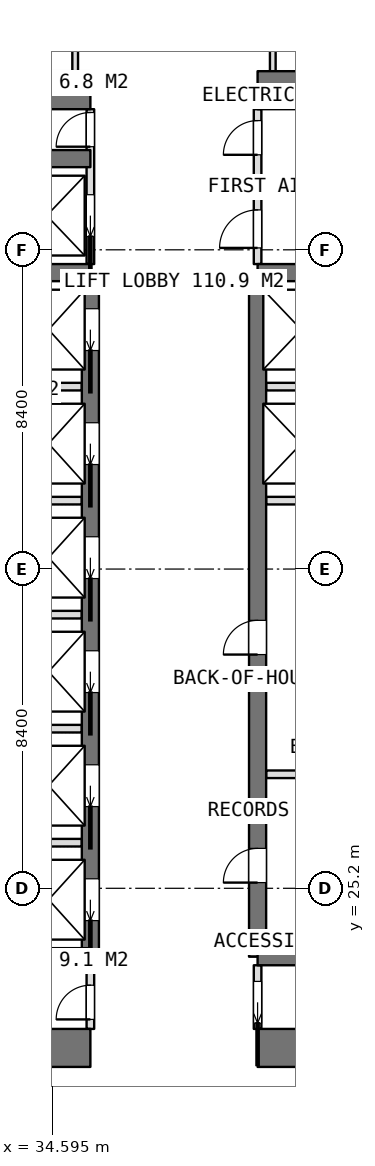
"""IFC4 building model, lengths in metres.
Left out: names, types, materials, properties, quantities, classifications, styles, units other than length and angle.
Written with IfcOpenShell. Run it as: python <this file> out.ifc"""

import sys

from ifc_helpers import new_model, si_unit, direction, frame, frame_2d, origin, place, context, subcontext, project, spatial, rectangle, extrude, element, fill, save


model = new_model("IFC4")
c1 = context("Model", 3, precision=1e-05, world=origin(), true_north=direction((0.0, 1.0)))
c2 = subcontext(c1, "Body", "Model", "MODEL_VIEW")
j1 = project(units=[si_unit("LENGTHUNIT", "METRE"), si_unit("PLANEANGLEUNIT", "RADIAN")], contexts=[c1])
p1 = place(None, origin())
s1 = spatial("IfcSite", under=j1, at=p1, CompositionType="ELEMENT")
p2 = place(p1, origin())
s2 = spatial("IfcBuilding", under=s1, at=p2, CompositionType="ELEMENT")
p3 = place(p2, frame((0.0, 0.0, 187.7)))
s3 = spatial("IfcBuildingStorey", under=s2, at=p3, CompositionType="ELEMENT", Elevation=187.7)
p4 = place(p3, frame((25.2, 21.0, 0.0), z_axis=(0.0, 0.0, 1.0), x_axis=(1.0, 0.0, 0.0)))
e1 = element("IfcWall", 1, at=p4, inside=s3, PredefinedType="SHEAR", context=c2, shape_type="SweptSolid", body=[
    extrude(rectangle(XDim=10.4, YDim=1.0, at=frame_2d((5.2, 0.0))), origin(), (0.0, 0.0, 1.0), 3.75),
])
p5 = place(p3, frame((40.0, 21.0, 0.0), z_axis=(0.0, 0.0, 1.0), x_axis=(1.0, 0.0, 0.0)))
e2 = element("IfcWall", 2, at=p5, inside=s3, PredefinedType="SHEAR", context=c2, shape_type="SweptSolid", body=[
    extrude(rectangle(XDim=10.4, YDim=1.0, at=frame_2d((5.2, 0.0))), origin(), (0.0, 0.0, 1.0), 3.75),
])
p6 = place(p3, frame((25.2, 46.2, 0.0), z_axis=(0.0, 0.0, 1.0), x_axis=(1.0, 0.0, 0.0)))
e3 = element("IfcWall", 3, at=p6, inside=s3, PredefinedType="SHEAR", context=c2, shape_type="SweptSolid", body=[
    extrude(rectangle(XDim=10.4, YDim=1.0, at=frame_2d((5.2, 0.0))), origin(), (0.0, 0.0, 1.0), 3.75),
])
p7 = place(p3, frame((40.0, 46.2, 0.0), z_axis=(0.0, 0.0, 1.0), x_axis=(1.0, 0.0, 0.0)))
e4 = element("IfcWall", 4, at=p7, inside=s3, PredefinedType="SHEAR", context=c2, shape_type="SweptSolid", body=[
    extrude(rectangle(XDim=10.4, YDim=1.0, at=frame_2d((5.2, 0.0))), origin(), (0.0, 0.0, 1.0), 3.75),
])
p8 = place(p3, frame((35.6, 23.4, 0.0), z_axis=(0.0, 0.0, 1.0), x_axis=(0.0, 1.0, 0.0)))
e5 = element("IfcWall", 5, at=p8, inside=s3, PredefinedType="SHEAR", context=c2, shape_type="SweptSolid", body=[
    extrude(rectangle(XDim=18.0, YDim=0.45, at=frame_2d((9.0, 0.0))), origin(), (0.0, 0.0, 1.0), 3.75),
])
p9 = place(p8, frame((0.95, 0.0, 0.0)))
e6 = element("IfcOpeningElement", 6, at=p9, cuts=e5, PredefinedType="OPENING", context=c2, shape_type="SweptSolid", body=[
    extrude(rectangle(XDim=1.1, YDim=2.1, at=frame_2d((0.55, 1.05))), frame((0.0, 0.235, 0.0), z_axis=(0.0, -1.0, 0.0), x_axis=(1.0, 0.0, 0.0)), (0.0, 0.0, 1.0), 0.47),
])
p10 = place(p8, frame((3.95, 0.0, 0.0)))
e7 = element("IfcOpeningElement", 7, at=p10, cuts=e5, PredefinedType="OPENING", context=c2, shape_type="SweptSolid", body=[
    extrude(rectangle(XDim=1.1, YDim=2.1, at=frame_2d((0.55, 1.05))), frame((0.0, 0.235, 0.0), z_axis=(0.0, -1.0, 0.0), x_axis=(1.0, 0.0, 0.0)), (0.0, 0.0, 1.0), 0.47),
])
p11 = place(p8, frame((6.95, 0.0, 0.0)))
e8 = element("IfcOpeningElement", 8, at=p11, cuts=e5, PredefinedType="OPENING", context=c2, shape_type="SweptSolid", body=[
    extrude(rectangle(XDim=1.1, YDim=2.1, at=frame_2d((0.55, 1.05))), frame((0.0, 0.235, 0.0), z_axis=(0.0, -1.0, 0.0), x_axis=(1.0, 0.0, 0.0)), (0.0, 0.0, 1.0), 0.47),
])
p12 = place(p8, frame((9.95, 0.0, 0.0)))
e9 = element("IfcOpeningElement", 9, at=p12, cuts=e5, PredefinedType="OPENING", context=c2, shape_type="SweptSolid", body=[
    extrude(rectangle(XDim=1.1, YDim=2.1, at=frame_2d((0.55, 1.05))), frame((0.0, 0.235, 0.0), z_axis=(0.0, -1.0, 0.0), x_axis=(1.0, 0.0, 0.0)), (0.0, 0.0, 1.0), 0.47),
])
p13 = place(p8, frame((12.95, 0.0, 0.0)))
e10 = element("IfcOpeningElement", 10, at=p13, cuts=e5, PredefinedType="OPENING", context=c2, shape_type="SweptSolid", body=[
    extrude(rectangle(XDim=1.1, YDim=2.1, at=frame_2d((0.55, 1.05))), frame((0.0, 0.235, 0.0), z_axis=(0.0, -1.0, 0.0), x_axis=(1.0, 0.0, 0.0)), (0.0, 0.0, 1.0), 0.47),
])
p14 = place(p8, frame((15.95, 0.0, 0.0)))
e11 = element("IfcOpeningElement", 11, at=p14, cuts=e5, PredefinedType="OPENING", context=c2, shape_type="SweptSolid", body=[
    extrude(rectangle(XDim=1.1, YDim=2.1, at=frame_2d((0.55, 1.05))), frame((0.0, 0.235, 0.0), z_axis=(0.0, -1.0, 0.0), x_axis=(1.0, 0.0, 0.0)), (0.0, 0.0, 1.0), 0.47),
])
p15 = place(p3, frame((40.0, 23.4, 0.0), z_axis=(0.0, 0.0, 1.0), x_axis=(0.0, 1.0, 0.0)))
e12 = element("IfcWall", 12, at=p15, inside=s3, PredefinedType="SHEAR", context=c2, shape_type="SweptSolid", body=[
    extrude(rectangle(XDim=18.0, YDim=0.45, at=frame_2d((9.0, 0.0))), origin(), (0.0, 0.0, 1.0), 3.75),
])
p16 = place(p15, frame((1.95, 0.0, 0.0)))
e13 = element("IfcOpeningElement", 13, at=p16, cuts=e12, PredefinedType="OPENING", context=c2, shape_type="SweptSolid", body=[
    extrude(rectangle(XDim=0.9, YDim=2.1, at=frame_2d((0.45, 1.05))), frame((0.0, 0.235, 0.0), z_axis=(0.0, -1.0, 0.0), x_axis=(1.0, 0.0, 0.0)), (0.0, 0.0, 1.0), 0.47),
])
p17 = place(p15, frame((7.95, 0.0, 0.0)))
e14 = element("IfcOpeningElement", 14, at=p17, cuts=e12, PredefinedType="OPENING", context=c2, shape_type="SweptSolid", body=[
    extrude(rectangle(XDim=0.9, YDim=2.1, at=frame_2d((0.45, 1.05))), frame((0.0, 0.235, 0.0), z_axis=(0.0, -1.0, 0.0), x_axis=(1.0, 0.0, 0.0)), (0.0, 0.0, 1.0), 0.47),
])
for number, where, z_axis, x_axis in (
    (15, (31.8, 23.4, 0.0), (0.0, 0.0, 1.0), (1.0, 0.0, 0.0)),
    (16, (31.8, 41.4, 0.0), (0.0, 0.0, 1.0), (1.0, 0.0, 0.0)),
    (17, (31.8, 44.4, 0.0), (0.0, 0.0, 1.0), (1.0, 0.0, 0.0)),
    (18, (40.0, 23.4, 0.0), (0.0, 0.0, 1.0), (1.0, 0.0, 0.0)),
    (19, (40.0, 41.4, 0.0), (0.0, 0.0, 1.0), (1.0, 0.0, 0.0)),
):
    element("IfcWall", number, at=place(p3, frame(where, z_axis=z_axis, x_axis=x_axis)), inside=s3, PredefinedType="SHEAR", context=c2, shape_type="SweptSolid", body=[
        extrude(rectangle(XDim=3.8, YDim=0.45, at=frame_2d((1.9, 0.0))), origin(), (0.0, 0.0, 1.0), 3.75),
    ])
for number, where, z_axis, x_axis in (
    (20, (32.025, 26.4, 0.0), (0.0, 0.0, 1.0), (1.0, 0.0, 0.0)),
    (21, (32.025, 29.4, 0.0), (0.0, 0.0, 1.0), (1.0, 0.0, 0.0)),
    (22, (32.025, 32.4, 0.0), (0.0, 0.0, 1.0), (1.0, 0.0, 0.0)),
    (23, (32.025, 35.4, 0.0), (0.0, 0.0, 1.0), (1.0, 0.0, 0.0)),
    (24, (32.025, 38.4, 0.0), (0.0, 0.0, 1.0), (1.0, 0.0, 0.0)),
):
    element("IfcWall", number, at=place(p3, frame(where, z_axis=z_axis, x_axis=x_axis)), inside=s3, PredefinedType="PARTITIONING", context=c2, shape_type="SweptSolid", body=[
        extrude(rectangle(XDim=3.35, YDim=0.2, at=frame_2d((1.675, 0.0))), origin(), (0.0, 0.0, 1.0), 3.5),
    ])
for number, where, z_axis, x_axis in (
    (25, (40.225, 35.4, 0.0), (0.0, 0.0, 1.0), (1.0, 0.0, 0.0)),
    (26, (40.225, 38.4, 0.0), (0.0, 0.0, 1.0), (1.0, 0.0, 0.0)),
):
    element("IfcWall", number, at=place(p3, frame(where, z_axis=z_axis, x_axis=x_axis)), inside=s3, PredefinedType="PARTITIONING", context=c2, shape_type="SweptSolid", body=[
        extrude(rectangle(XDim=3.35, YDim=0.2, at=frame_2d((1.675, 0.0))), origin(), (0.0, 0.0, 1.0), 3.5),
    ])
p18 = place(p3, frame((40.0, 21.5, 0.0), z_axis=(0.0, 0.0, 1.0), x_axis=(0.0, 1.0, 0.0)))
e27 = element("IfcWall", 27, at=p18, inside=s3, PredefinedType="PARTITIONING", context=c2, shape_type="SweptSolid", body=[
    extrude(rectangle(XDim=1.675, YDim=0.2, at=frame_2d((0.837, 0.0))), origin(), (0.0, 0.0, 1.0), 3.5),
])
p19 = place(p18, frame((0.15, 0.0, 0.0)))
e28 = element("IfcOpeningElement", 28, at=p19, cuts=e27, PredefinedType="OPENING", context=c2, shape_type="SweptSolid", body=[
    extrude(rectangle(XDim=1.1, YDim=2.1, at=frame_2d((0.55, 1.05))), frame((0.0, 0.11, 0.0), z_axis=(0.0, -1.0, 0.0), x_axis=(1.0, 0.0, 0.0)), (0.0, 0.0, 1.0), 0.22),
])
p20 = place(p3, frame((40.0, 41.625, 0.0), z_axis=(0.0, 0.0, 1.0), x_axis=(0.0, 1.0, 0.0)))
e29 = element("IfcWall", 29, at=p20, inside=s3, PredefinedType="PARTITIONING", context=c2, shape_type="SweptSolid", body=[
    extrude(rectangle(XDim=4.075, YDim=0.2, at=frame_2d((2.038, 0.0))), origin(), (0.0, 0.0, 1.0), 3.5),
])
p21 = place(p20, frame((2.875, 0.0, 0.0)))
e30 = element("IfcOpeningElement", 30, at=p21, cuts=e29, PredefinedType="OPENING", context=c2, shape_type="SweptSolid", body=[
    extrude(rectangle(XDim=0.9, YDim=2.1, at=frame_2d((0.45, 1.05))), frame((0.0, 0.11, 0.0), z_axis=(0.0, -1.0, 0.0), x_axis=(1.0, 0.0, 0.0)), (0.0, 0.0, 1.0), 0.22),
])
p22 = place(p20, frame((0.425, 0.0, 0.0)))
e31 = element("IfcOpeningElement", 31, at=p22, cuts=e29, PredefinedType="OPENING", context=c2, shape_type="SweptSolid", body=[
    extrude(rectangle(XDim=1.0, YDim=2.1, at=frame_2d((0.5, 1.05))), frame((0.0, 0.11, 0.0), z_axis=(0.0, -1.0, 0.0), x_axis=(1.0, 0.0, 0.0)), (0.0, 0.0, 1.0), 0.22),
])
p23 = place(p3, frame((35.6, 41.625, 0.0), z_axis=(0.0, 0.0, 1.0), x_axis=(0.0, 1.0, 0.0)))
e32 = element("IfcWall", 32, at=p23, inside=s3, PredefinedType="PARTITIONING", context=c2, shape_type="SweptSolid", body=[
    extrude(rectangle(XDim=4.075, YDim=0.2, at=frame_2d((2.038, 0.0))), origin(), (0.0, 0.0, 1.0), 3.5),
])
p24 = place(p23, frame((3.088, 0.0, 0.0)))
e33 = element("IfcOpeningElement", 33, at=p24, cuts=e32, PredefinedType="OPENING", context=c2, shape_type="SweptSolid", body=[
    extrude(rectangle(XDim=0.9, YDim=2.1, at=frame_2d((0.45, 1.05))), frame((0.0, 0.11, 0.0), z_axis=(0.0, -1.0, 0.0), x_axis=(1.0, 0.0, 0.0)), (0.0, 0.0, 1.0), 0.22),
])
p25 = place(p23, frame((0.725, 0.0, 0.0)))
e34 = element("IfcOpeningElement", 34, at=p25, cuts=e32, PredefinedType="OPENING", context=c2, shape_type="SweptSolid", body=[
    extrude(rectangle(XDim=1.1, YDim=2.1, at=frame_2d((0.55, 1.05))), frame((0.0, 0.11, 0.0), z_axis=(0.0, -1.0, 0.0), x_axis=(1.0, 0.0, 0.0)), (0.0, 0.0, 1.0), 0.22),
])
p26 = place(p3, frame((35.6, 21.5, 0.0), z_axis=(0.0, 0.0, 1.0), x_axis=(0.0, 1.0, 0.0)))
e35 = element("IfcWall", 35, at=p26, inside=s3, PredefinedType="PARTITIONING", context=c2, shape_type="SweptSolid", body=[
    extrude(rectangle(XDim=1.675, YDim=0.2, at=frame_2d((0.837, 0.0))), origin(), (0.0, 0.0, 1.0), 3.5),
])
p27 = place(p26, frame((0.25, 0.0, 0.0)))
e36 = element("IfcOpeningElement", 36, at=p27, cuts=e35, PredefinedType="OPENING", context=c2, shape_type="SweptSolid", body=[
    extrude(rectangle(XDim=0.9, YDim=2.1, at=frame_2d((0.45, 1.05))), frame((0.0, 0.11, 0.0), z_axis=(0.0, -1.0, 0.0), x_axis=(1.0, 0.0, 0.0)), (0.0, 0.0, 1.0), 0.22),
])
p28 = place(p3, frame((40.225, 28.2, 0.0), z_axis=(0.0, 0.0, 1.0), x_axis=(1.0, 0.0, 0.0)))
e37 = element("IfcWall", 37, at=p28, inside=s3, PredefinedType="PARTITIONING", context=c2, shape_type="SweptSolid", body=[
    extrude(rectangle(XDim=3.35, YDim=0.2, at=frame_2d((1.675, 0.0))), origin(), (0.0, 0.0, 1.0), 3.5),
])
p29 = place(p3, frame((40.0, 43.7, 0.0), z_axis=(0.0, 0.0, 1.0), x_axis=(1.0, 0.0, 0.0)))
e38 = element("IfcWall", 38, at=p29, inside=s3, PredefinedType="PARTITIONING", context=c2, shape_type="SweptSolid", body=[
    extrude(rectangle(XDim=3.575, YDim=0.2, at=frame_2d((1.788, 0.0))), origin(), (0.0, 0.0, 1.0), 3.5),
])
for number, where, z_axis, x_axis in (
    (39, (40.4, 46.7, 0.0), (0.0, 0.0, 1.0), (0.0, 1.0, 0.0)),
    (40, (35.2, 46.7, 0.0), (0.0, 0.0, 1.0), (0.0, 1.0, 0.0)),
):
    element("IfcWall", number, at=place(p3, frame(where, z_axis=z_axis, x_axis=x_axis)), inside=s3, PredefinedType="PARTITIONING", context=c2, shape_type="SweptSolid", body=[
        extrude(rectangle(XDim=2.625, YDim=0.15, at=frame_2d((1.312, 0.0))), origin(), (0.0, 0.0, 1.0), 3.5),
    ])
p30 = place(p19, origin())
e41 = element("IfcDoor", 41, at=p30, inside=s3, OperationType="SLIDING_TO_LEFT", PredefinedType="DOOR", context=c2, shape_type="SweptSolid", body=[
    extrude(rectangle(XDim=1.1, YDim=2.1, at=frame_2d((0.55, 1.05))), frame((0.0, 0.025, 0.0), z_axis=(0.0, -1.0, 0.0), x_axis=(1.0, 0.0, 0.0)), (0.0, 0.0, 1.0), 0.05),
])
fill(e28, e41)
p31 = place(p27, origin())
e42 = element("IfcDoor", 42, at=p31, inside=s3, OperationType="SINGLE_SWING_LEFT", PredefinedType="DOOR", context=c2, shape_type="SweptSolid", body=[
    extrude(rectangle(XDim=0.9, YDim=2.1, at=frame_2d((0.45, 1.05))), frame((0.0, 0.025, 0.0), z_axis=(0.0, -1.0, 0.0), x_axis=(1.0, 0.0, 0.0)), (0.0, 0.0, 1.0), 0.05),
])
fill(e36, e42)
p32 = place(p21, origin())
e43 = element("IfcDoor", 43, at=p32, inside=s3, OperationType="SINGLE_SWING_LEFT", PredefinedType="DOOR", context=c2, shape_type="SweptSolid", body=[
    extrude(rectangle(XDim=0.9, YDim=2.1, at=frame_2d((0.45, 1.05))), frame((0.0, 0.025, 0.0), z_axis=(0.0, -1.0, 0.0), x_axis=(1.0, 0.0, 0.0)), (0.0, 0.0, 1.0), 0.05),
])
fill(e30, e43)
p33 = place(p22, origin())
e44 = element("IfcDoor", 44, at=p33, inside=s3, OperationType="SINGLE_SWING_LEFT", PredefinedType="DOOR", context=c2, shape_type="SweptSolid", body=[
    extrude(rectangle(XDim=1.0, YDim=2.1, at=frame_2d((0.5, 1.05))), frame((0.0, 0.025, 0.0), z_axis=(0.0, -1.0, 0.0), x_axis=(1.0, 0.0, 0.0)), (0.0, 0.0, 1.0), 0.05),
])
fill(e31, e44)
p34 = place(p16, origin())
e45 = element("IfcDoor", 45, at=p34, inside=s3, OperationType="SINGLE_SWING_LEFT", PredefinedType="DOOR", context=c2, shape_type="SweptSolid", body=[
    extrude(rectangle(XDim=0.9, YDim=2.1, at=frame_2d((0.45, 1.05))), frame((0.0, 0.025, 0.0), z_axis=(0.0, -1.0, 0.0), x_axis=(1.0, 0.0, 0.0)), (0.0, 0.0, 1.0), 0.05),
])
fill(e13, e45)
p35 = place(p17, origin())
e46 = element("IfcDoor", 46, at=p35, inside=s3, OperationType="SINGLE_SWING_LEFT", PredefinedType="DOOR", context=c2, shape_type="SweptSolid", body=[
    extrude(rectangle(XDim=0.9, YDim=2.1, at=frame_2d((0.45, 1.05))), frame((0.0, 0.025, 0.0), z_axis=(0.0, -1.0, 0.0), x_axis=(1.0, 0.0, 0.0)), (0.0, 0.0, 1.0), 0.05),
])
fill(e14, e46)
p36 = place(p24, origin())
e47 = element("IfcDoor", 47, at=p36, inside=s3, OperationType="SINGLE_SWING_LEFT", PredefinedType="DOOR", context=c2, shape_type="SweptSolid", body=[
    extrude(rectangle(XDim=0.9, YDim=2.1, at=frame_2d((0.45, 1.05))), frame((0.0, 0.025, 0.0), z_axis=(0.0, -1.0, 0.0), x_axis=(1.0, 0.0, 0.0)), (0.0, 0.0, 1.0), 0.05),
])
fill(e33, e47)
p37 = place(p9, origin())
e48 = element("IfcDoor", 48, at=p37, inside=s3, OperationType="SLIDING_TO_LEFT", PredefinedType="USERDEFINED", context=c2, shape_type="SweptSolid", body=[
    extrude(rectangle(XDim=1.1, YDim=2.1, at=frame_2d((0.55, 1.05))), frame((0.0, 0.025, 0.0), z_axis=(0.0, -1.0, 0.0), x_axis=(1.0, 0.0, 0.0)), (0.0, 0.0, 1.0), 0.05),
])
fill(e6, e48)
p38 = place(p10, origin())
e49 = element("IfcDoor", 49, at=p38, inside=s3, OperationType="SLIDING_TO_LEFT", PredefinedType="USERDEFINED", context=c2, shape_type="SweptSolid", body=[
    extrude(rectangle(XDim=1.1, YDim=2.1, at=frame_2d((0.55, 1.05))), frame((0.0, 0.025, 0.0), z_axis=(0.0, -1.0, 0.0), x_axis=(1.0, 0.0, 0.0)), (0.0, 0.0, 1.0), 0.05),
])
fill(e7, e49)
p39 = place(p11, origin())
e50 = element("IfcDoor", 50, at=p39, inside=s3, OperationType="SLIDING_TO_LEFT", PredefinedType="USERDEFINED", context=c2, shape_type="SweptSolid", body=[
    extrude(rectangle(XDim=1.1, YDim=2.1, at=frame_2d((0.55, 1.05))), frame((0.0, 0.025, 0.0), z_axis=(0.0, -1.0, 0.0), x_axis=(1.0, 0.0, 0.0)), (0.0, 0.0, 1.0), 0.05),
])
fill(e8, e50)
p40 = place(p12, origin())
e51 = element("IfcDoor", 51, at=p40, inside=s3, OperationType="SLIDING_TO_LEFT", PredefinedType="USERDEFINED", context=c2, shape_type="SweptSolid", body=[
    extrude(rectangle(XDim=1.1, YDim=2.1, at=frame_2d((0.55, 1.05))), frame((0.0, 0.025, 0.0), z_axis=(0.0, -1.0, 0.0), x_axis=(1.0, 0.0, 0.0)), (0.0, 0.0, 1.0), 0.05),
])
fill(e9, e51)
p41 = place(p13, origin())
e52 = element("IfcDoor", 52, at=p41, inside=s3, OperationType="SLIDING_TO_LEFT", PredefinedType="USERDEFINED", context=c2, shape_type="SweptSolid", body=[
    extrude(rectangle(XDim=1.1, YDim=2.1, at=frame_2d((0.55, 1.05))), frame((0.0, 0.025, 0.0), z_axis=(0.0, -1.0, 0.0), x_axis=(1.0, 0.0, 0.0)), (0.0, 0.0, 1.0), 0.05),
])
fill(e10, e52)
p42 = place(p14, origin())
e53 = element("IfcDoor", 53, at=p42, inside=s3, OperationType="SLIDING_TO_LEFT", PredefinedType="USERDEFINED", context=c2, shape_type="SweptSolid", body=[
    extrude(rectangle(XDim=1.1, YDim=2.1, at=frame_2d((0.55, 1.05))), frame((0.0, 0.025, 0.0), z_axis=(0.0, -1.0, 0.0), x_axis=(1.0, 0.0, 0.0)), (0.0, 0.0, 1.0), 0.05),
])
fill(e11, e53)
p43 = place(p25, origin())
e54 = element("IfcDoor", 54, at=p43, inside=s3, OperationType="SLIDING_TO_LEFT", PredefinedType="USERDEFINED", context=c2, shape_type="SweptSolid", body=[
    extrude(rectangle(XDim=1.1, YDim=2.1, at=frame_2d((0.55, 1.05))), frame((0.0, 0.025, 0.0), z_axis=(0.0, -1.0, 0.0), x_axis=(1.0, 0.0, 0.0)), (0.0, 0.0, 1.0), 0.05),
])
fill(e34, e54)
save(model, sys.argv[1])
